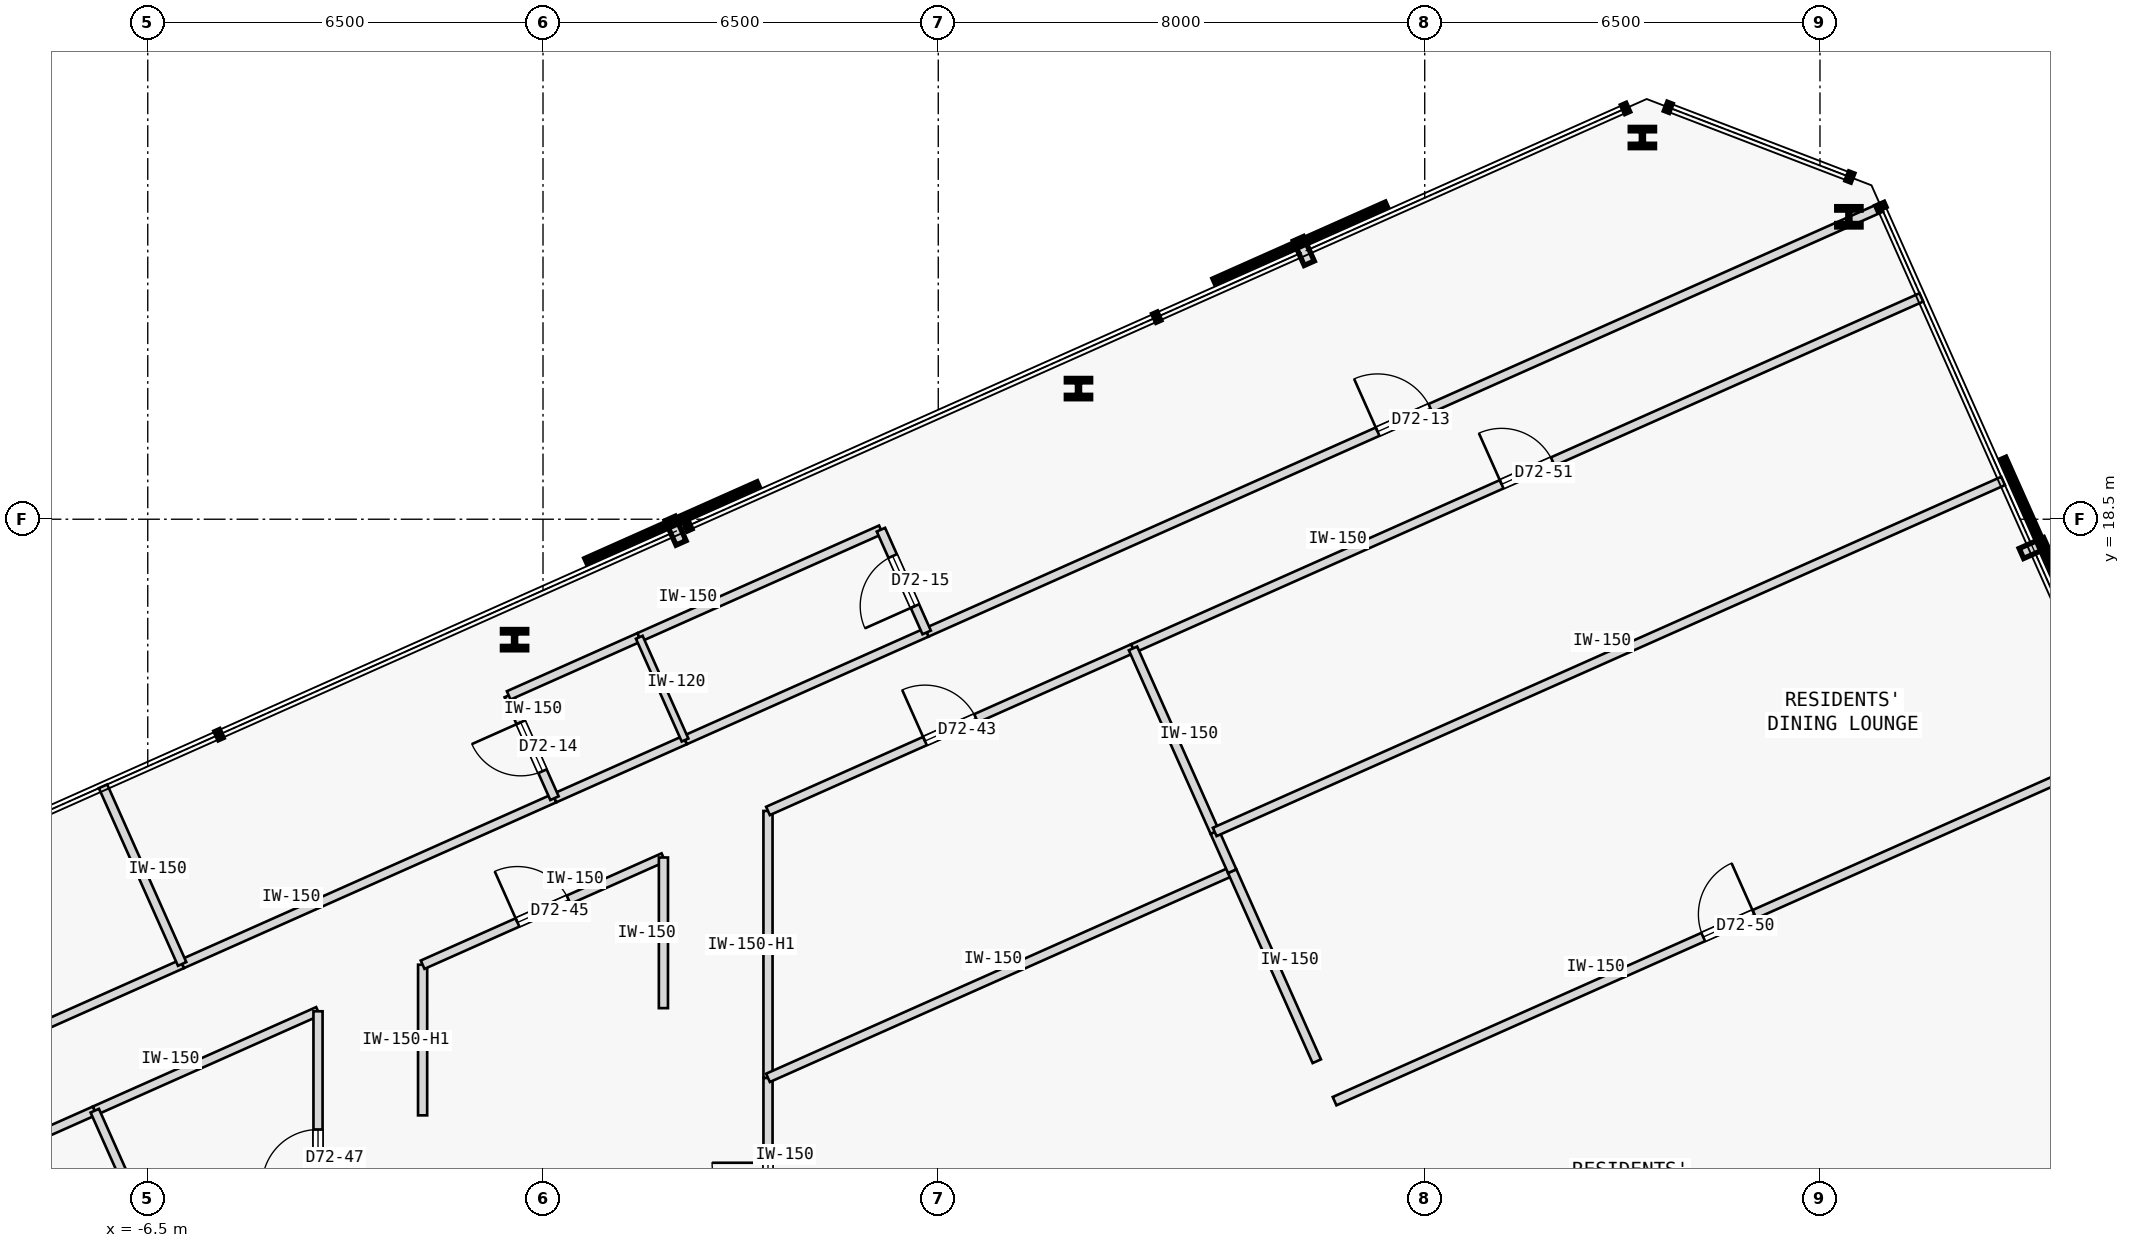
"""IFC4 building model, lengths in metres.
Left out: names, types, materials, properties, quantities, classifications, styles, units other than length and angle.
Written with IfcOpenShell. Run it as: python <this file> out.ifc"""

import sys

from ifc_helpers import new_model, si_unit, direction, frame, frame_2d, origin, origin_2d, place, context, subcontext, project, spatial, rectangle, i_section, extrude, element, fill, save


model = new_model("IFC4")
c1 = context("Model", 3, precision=1e-05, world=origin(), true_north=direction((0.0, 1.0)))
c2 = subcontext(c1, "Body", "Model", "MODEL_VIEW")
j1 = project(units=[si_unit("LENGTHUNIT", "METRE"), si_unit("PLANEANGLEUNIT", "RADIAN")], contexts=[c1])
p1 = place(None, origin())
s1 = spatial("IfcSite", under=j1, at=p1, CompositionType="ELEMENT")
p2 = place(p1, origin())
s2 = spatial("IfcBuilding", under=s1, at=p2, CompositionType="ELEMENT")
p3 = place(p2, frame((0.0, 0.0, 268.9)))
s3 = spatial("IfcBuildingStorey", under=s2, at=p3, CompositionType="ELEMENT", Elevation=268.9)
for number, where, z_axis, x_axis in (
    (1, (21.476, 23.473, 0.0), (0.0, 0.0, 1.0), (1.0, 0.0, 0.0)),
    (2, (18.08, 24.777, 0.0), (0.0, 0.0, 1.0), (1.0, 0.0, 0.0)),
    (3, (8.806, 20.648, 0.0), (0.0, 0.0, 1.0), (1.0, 0.0, 0.0)),
    (4, (-0.468, 16.519, 0.0), (0.0, 0.0, 1.0), (1.0, 0.0, 0.0)),
):
    element("IfcColumn", number, at=place(p3, frame(where, z_axis=z_axis, x_axis=x_axis)), inside=s3, PredefinedType="COLUMN", context=c2, shape_type="SweptSolid", body=[
        extrude(i_section(OverallWidth=0.401, OverallDepth=0.335, WebThickness=0.036, FlangeThickness=0.058, FilletRadius=0.015, at=origin_2d()), origin(), (0.0, 0.0, 1.0), 3.35),
    ])
p4 = place(p3, frame((-18.549, 5.57, 0.0), z_axis=(0.0, 0.0, 1.0), x_axis=(0.913545955058, 0.40673552586, 0.0)))
e5 = element("IfcWall", 5, at=p4, inside=s3, PredefinedType="PARTITIONING", context=c2, shape_type="SweptSolid", body=[
    extrude(rectangle(XDim=13.808, YDim=0.15, at=frame_2d((6.904, 0.0))), origin(), (0.0, 0.0, 1.0), 3.125),
])
p5 = place(p4, frame((6.429, 0.0, 0.0)))
e6 = element("IfcOpeningElement", 6, at=p5, cuts=e5, PredefinedType="OPENING", context=c2, shape_type="SweptSolid", body=[
    extrude(rectangle(XDim=0.95, YDim=2.15, at=frame_2d((0.475, 1.075))), frame((0.0, 0.085, 0.0), z_axis=(0.0, -1.0, 0.0), x_axis=(1.0, 0.0, 0.0)), (0.0, 0.0, 1.0), 0.17),
])
p6 = place(p3, frame((-5.935, 11.187, 0.0), z_axis=(0.0, 0.0, 1.0), x_axis=(0.91354851465, 0.406729776856, 0.0)))
e7 = element("IfcWall", 7, at=p6, inside=s3, PredefinedType="PARTITIONING", context=c2, shape_type="SweptSolid", body=[
    extrude(rectangle(XDim=6.703, YDim=0.15, at=frame_2d((3.352, 0.0))), origin(), (0.0, 0.0, 1.0), 3.125),
])
p7 = place(p3, frame((6.31, 16.638, 0.0), z_axis=(0.0, 0.0, 1.0), x_axis=(0.913550659227, 0.406724959925, 0.0)))
e8 = element("IfcWall", 8, at=p7, inside=s3, PredefinedType="PARTITIONING", context=c2, shape_type="SweptSolid", body=[
    extrude(rectangle(XDim=17.185, YDim=0.15, at=frame_2d((8.592, 0.0))), origin(), (0.0, 0.0, 1.0), 3.125),
])
p8 = place(p7, frame((8.117, 0.0, 0.0)))
e9 = element("IfcOpeningElement", 9, at=p8, cuts=e8, PredefinedType="OPENING", context=c2, shape_type="SweptSolid", body=[
    extrude(rectangle(XDim=0.95, YDim=2.15, at=frame_2d((0.475, 1.075))), frame((0.0, 0.085, 0.0), z_axis=(0.0, -1.0, 0.0), x_axis=(1.0, 0.0, 0.0)), (0.0, 0.0, 1.0), 0.17),
])
p9 = place(p3, frame((0.189, 13.913, 0.0), z_axis=(0.0, 0.0, 1.0), x_axis=(0.913520021435, 0.406793768926, 0.0)))
e10 = element("IfcWall", 10, at=p9, inside=s3, PredefinedType="PARTITIONING", context=c2, shape_type="SweptSolid", body=[
    extrude(rectangle(XDim=2.35, YDim=0.15, at=frame_2d((1.175, 0.0))), origin(), (0.0, 0.0, 1.0), 3.125),
])
p10 = place(p3, frame((2.336, 14.869, 0.0), z_axis=(0.0, 0.0, 1.0), x_axis=(0.913545193015, 0.406737237438, 0.0)))
e11 = element("IfcWall", 11, at=p10, inside=s3, PredefinedType="PARTITIONING", context=c2, shape_type="SweptSolid", body=[
    extrude(rectangle(XDim=4.35, YDim=0.15, at=frame_2d((2.175, 0.0))), origin(), (0.0, 0.0, 1.0), 3.125),
])
p11 = place(p3, frame((3.7, 5.601, 0.0), z_axis=(0.0, 0.0, 1.0), x_axis=(0.0, 1.0, 0.0)))
e12 = element("IfcWall", 12, at=p11, inside=s3, PredefinedType="PARTITIONING", context=c2, shape_type="SweptSolid", body=[
    extrude(rectangle(XDim=3.713, YDim=0.15, at=frame_2d((1.856, 0.0))), origin(), (0.0, 0.0, 1.0), 3.125),
])
p12 = place(p11, frame((1.396, 0.0, 0.0)))
e13 = element("IfcOpeningElement", 13, at=p12, cuts=e12, PredefinedType="OPENING", context=c2, shape_type="SweptSolid", body=[
    extrude(rectangle(XDim=0.92, YDim=2.15, at=frame_2d((0.46, 1.075))), frame((0.0, 0.085, 0.0), z_axis=(0.0, -1.0, 0.0), x_axis=(1.0, 0.0, 0.0)), (0.0, 0.0, 1.0), 0.17),
])
p13 = place(p3, frame((3.7, 9.313, 0.0), z_axis=(0.0, 0.0, 1.0), x_axis=(-0.000111240891, 0.999999993813, 0.0)))
e14 = element("IfcWall", 14, at=p13, inside=s3, PredefinedType="PARTITIONING", context=c2, shape_type="SweptSolid", body=[
    extrude(rectangle(XDim=4.389, YDim=0.15, at=frame_2d((2.195, 0.0))), origin(), (0.0, 0.0, 1.0), 2.675),
])
p14 = place(p3, frame((3.7, 13.703, 0.0), z_axis=(0.0, 0.0, 1.0), x_axis=(0.913549363376, 0.406727870542, 0.0)))
e15 = element("IfcWall", 15, at=p14, inside=s3, PredefinedType="PARTITIONING", context=c2, shape_type="SweptSolid", body=[
    extrude(rectangle(XDim=6.571, YDim=0.15, at=frame_2d((3.286, 0.0))), origin(), (0.0, 0.0, 1.0), 3.125),
])
p15 = place(p14, frame((2.825, 0.0, 0.0)))
e16 = element("IfcOpeningElement", 16, at=p15, cuts=e15, PredefinedType="OPENING", context=c2, shape_type="SweptSolid", body=[
    extrude(rectangle(XDim=0.92, YDim=2.15, at=frame_2d((0.46, 1.075))), frame((0.0, 0.085, 0.0), z_axis=(0.0, -1.0, 0.0), x_axis=(1.0, 0.0, 0.0)), (0.0, 0.0, 1.0), 0.17),
])
p16 = place(p3, frame((-1.98, 8.697, 0.0), z_axis=(0.0, 0.0, 1.0), x_axis=(0.000197102588, 0.999999980575, 0.0)))
e17 = element("IfcWall", 17, at=p16, inside=s3, PredefinedType="PARTITIONING", context=c2, shape_type="SweptSolid", body=[
    extrude(rectangle(XDim=2.477, YDim=0.15, at=frame_2d((1.239, 0.0))), origin(), (0.0, 0.0, 1.0), 2.675),
])
p17 = place(p3, frame((-1.98, 11.174, 0.0), z_axis=(0.0, 0.0, 1.0), x_axis=(0.913546598225, 0.406734081276, 0.0)))
e18 = element("IfcWall", 18, at=p17, inside=s3, PredefinedType="PARTITIONING", context=c2, shape_type="SweptSolid", body=[
    extrude(rectangle(XDim=4.335, YDim=0.15, at=frame_2d((2.167, 0.0))), origin(), (0.0, 0.0, 1.0), 3.125),
])
p18 = place(p17, frame((1.708, 0.0, 0.0)))
e19 = element("IfcOpeningElement", 19, at=p18, cuts=e18, PredefinedType="OPENING", context=c2, shape_type="SweptSolid", body=[
    extrude(rectangle(XDim=0.92, YDim=2.15, at=frame_2d((0.46, 1.075))), frame((0.0, 0.085, 0.0), z_axis=(0.0, -1.0, 0.0), x_axis=(1.0, 0.0, 0.0)), (0.0, 0.0, 1.0), 0.17),
])
p19 = place(p3, frame((1.98, 10.46, 0.0), z_axis=(0.0, 0.0, 1.0), x_axis=(0.000197102588, 0.999999980575, 0.0)))
e20 = element("IfcWall", 20, at=p19, inside=s3, PredefinedType="PARTITIONING", context=c2, shape_type="SweptSolid", body=[
    extrude(rectangle(XDim=2.477, YDim=0.15, at=frame_2d((1.239, 0.0))), origin(), (0.0, 0.0, 1.0), 3.125),
])
p20 = place(p3, frame((-10.504, 7.379, 0.0), z_axis=(0.0, 0.0, 1.0), x_axis=(0.913526514415, 0.406779187596, 0.0)))
e21 = element("IfcWall", 21, at=p20, inside=s3, PredefinedType="PARTITIONING", context=c2, shape_type="SweptSolid", body=[
    extrude(rectangle(XDim=3.429, YDim=0.15, at=frame_2d((1.714, 0.0))), origin(), (0.0, 0.0, 1.0), 3.125),
])
p21 = place(p20, frame((1.254, 0.0, 0.0)))
e22 = element("IfcOpeningElement", 22, at=p21, cuts=e21, PredefinedType="OPENING", context=c2, shape_type="SweptSolid", body=[
    extrude(rectangle(XDim=0.92, YDim=2.15, at=frame_2d((0.46, 1.075))), frame((0.0, 0.085, 0.0), z_axis=(0.0, -1.0, 0.0), x_axis=(1.0, 0.0, 0.0)), (0.0, 0.0, 1.0), 0.17),
])
p22 = place(p3, frame((-7.372, 8.774, 0.0), z_axis=(0.0, 0.0, 1.0), x_axis=(0.913563383118, 0.406696379412, 0.0)))
e23 = element("IfcWall", 23, at=p22, inside=s3, PredefinedType="PARTITIONING", context=c2, shape_type="SweptSolid", body=[
    extrude(rectangle(XDim=4.019, YDim=0.15, at=frame_2d((2.01, 0.0))), origin(), (0.0, 0.0, 1.0), 3.125),
])
p23 = place(p3, frame((-3.7, 5.6, 0.0), z_axis=(0.0, 0.0, 1.0), x_axis=(5.077173e-05, 0.999999998711, 0.0)))
e24 = element("IfcWall", 24, at=p23, inside=s3, PredefinedType="PARTITIONING", context=c2, shape_type="SweptSolid", body=[
    extrude(rectangle(XDim=4.809, YDim=0.15, at=frame_2d((2.404, 0.0))), origin(), (0.0, 0.0, 1.0), 3.125),
])
p24 = place(p23, frame((1.944, 0.0, 0.0)))
e25 = element("IfcOpeningElement", 25, at=p24, cuts=e24, PredefinedType="OPENING", context=c2, shape_type="SweptSolid", body=[
    extrude(rectangle(XDim=0.92, YDim=2.15, at=frame_2d((0.46, 1.075))), frame((0.0, 0.085, 0.0), z_axis=(0.0, -1.0, 0.0), x_axis=(1.0, 0.0, 0.0)), (0.0, 0.0, 1.0), 0.17),
])
p25 = place(p3, frame((9.703, 16.375, 0.0), z_axis=(0.0, 0.0, 1.0), x_axis=(0.913544622417, 0.406738519018, 0.0)))
e26 = element("IfcWall", 26, at=p25, inside=s3, PredefinedType="PARTITIONING", context=c2, shape_type="SweptSolid", body=[
    extrude(rectangle(XDim=14.192, YDim=0.15, at=frame_2d((7.096, 0.0))), origin(), (0.0, 0.0, 1.0), 3.125),
])
p26 = place(p25, frame((6.636, 0.0, 0.0)))
e27 = element("IfcOpeningElement", 27, at=p26, cuts=e26, PredefinedType="OPENING", context=c2, shape_type="SweptSolid", body=[
    extrude(rectangle(XDim=0.92, YDim=2.15, at=frame_2d((0.46, 1.075))), frame((0.0, 0.085, 0.0), z_axis=(0.0, -1.0, 0.0), x_axis=(1.0, 0.0, 0.0)), (0.0, 0.0, 1.0), 0.17),
])
p27 = place(p3, frame((-5.935, 11.187, 0.0), z_axis=(0.0, 0.0, 1.0), x_axis=(-0.406733350739, 0.913546923478, 0.0)))
e28 = element("IfcWall", 28, at=p27, inside=s3, PredefinedType="PARTITIONING", context=c2, shape_type="SweptSolid", body=[
    extrude(rectangle(XDim=3.198, YDim=0.15, at=frame_2d((1.599, 0.0))), origin(), (0.0, 0.0, 1.0), 3.125),
])
p28 = place(p3, frame((0.189, 13.913, 0.0), z_axis=(0.0, 0.0, 1.0), x_axis=(-0.406701600856, 0.913561058639, 0.0)))
e29 = element("IfcWall", 29, at=p28, inside=s3, PredefinedType="PARTITIONING", context=c2, shape_type="SweptSolid", body=[
    extrude(rectangle(XDim=1.85, YDim=0.15, at=frame_2d((0.925, 0.0))), origin(), (0.0, 0.0, 1.0), 3.125),
])
p29 = place(p28, frame((0.485, 0.0, 0.0)))
e30 = element("IfcOpeningElement", 30, at=p29, cuts=e29, PredefinedType="OPENING", context=c2, shape_type="SweptSolid", body=[
    extrude(rectangle(XDim=0.88, YDim=2.15, at=frame_2d((0.44, 1.075))), frame((0.0, 0.085, 0.0), z_axis=(0.0, -1.0, 0.0), x_axis=(1.0, 0.0, 0.0)), (0.0, 0.0, 1.0), 0.17),
])
p30 = place(p3, frame((-0.564, 15.603, 0.0), z_axis=(0.0, 0.0, 1.0), x_axis=(0.913541436194, 0.406745675276, 0.0)))
e31 = element("IfcWall", 31, at=p30, inside=s3, PredefinedType="PARTITIONING", context=c2, shape_type="SweptSolid", body=[
    extrude(rectangle(XDim=2.35, YDim=0.15, at=frame_2d((1.175, 0.0))), origin(), (0.0, 0.0, 1.0), 3.125),
])
p31 = place(p3, frame((1.583, 16.559, 0.0), z_axis=(0.0, 0.0, 1.0), x_axis=(0.913554477336, 0.406716383908, 0.0)))
e32 = element("IfcWall", 32, at=p31, inside=s3, PredefinedType="PARTITIONING", context=c2, shape_type="SweptSolid", body=[
    extrude(rectangle(XDim=4.35, YDim=0.15, at=frame_2d((2.175, 0.0))), origin(), (0.0, 0.0, 1.0), 3.125),
])
p32 = place(p3, frame((6.31, 16.638, 0.0), z_axis=(0.0, 0.0, 1.0), x_axis=(-0.406750635596, 0.913539227643, 0.0)))
e33 = element("IfcWall", 33, at=p32, inside=s3, PredefinedType="PARTITIONING", context=c2, shape_type="SweptSolid", body=[
    extrude(rectangle(XDim=1.85, YDim=0.15, at=frame_2d((0.925, 0.0))), origin(), (0.0, 0.0, 1.0), 3.125),
])
p33 = place(p32, frame((0.475, 0.0, 0.0)))
e34 = element("IfcOpeningElement", 34, at=p33, cuts=e33, PredefinedType="OPENING", context=c2, shape_type="SweptSolid", body=[
    extrude(rectangle(XDim=0.9, YDim=2.15, at=frame_2d((0.45, 1.075))), frame((0.0, 0.085, 0.0), z_axis=(0.0, -1.0, 0.0), x_axis=(1.0, 0.0, 0.0)), (0.0, 0.0, 1.0), 0.17),
])
p34 = place(p3, frame((2.336, 14.869, 0.0), z_axis=(0.0, 0.0, 1.0), x_axis=(-0.406860767979, 0.913490183571, 0.0)))
e35 = element("IfcWall", 35, at=p34, inside=s3, PredefinedType="PARTITIONING", context=c2, shape_type="SweptSolid", body=[
    extrude(rectangle(XDim=1.85, YDim=0.12, at=frame_2d((0.925, 0.0))), origin(), (0.0, 0.0, 1.0), 3.125),
])
p35 = place(p3, frame((3.7, 9.313, 0.0), z_axis=(0.0, 0.0, 1.0), x_axis=(0.913545080962, 0.406737489112, 0.0)))
e36 = element("IfcWall", 36, at=p35, inside=s3, PredefinedType="PARTITIONING", context=c2, shape_type="SweptSolid", body=[
    extrude(rectangle(XDim=8.356, YDim=0.15, at=frame_2d((4.178, 0.0))), origin(), (0.0, 0.0, 1.0), 3.125),
])
p36 = place(p3, frame((12.725, 9.587, 0.0), z_axis=(0.0, 0.0, 1.0), x_axis=(-0.406714462948, 0.913555332549, 0.0)))
e37 = element("IfcWall", 37, at=p36, inside=s3, PredefinedType="PARTITIONING", context=c2, shape_type="SweptSolid", body=[
    extrude(rectangle(XDim=3.421, YDim=0.15, at=frame_2d((1.71, 0.0))), origin(), (0.0, 0.0, 1.0), 3.125),
])
p37 = place(p3, frame((11.334, 12.712, 0.0), z_axis=(0.0, 0.0, 1.0), x_axis=(-0.40694029237, 0.913454759934, 0.0)))
e38 = element("IfcWall", 38, at=p37, inside=s3, PredefinedType="PARTITIONING", context=c2, shape_type="SweptSolid", body=[
    extrude(rectangle(XDim=0.706, YDim=0.15, at=frame_2d((0.353, 0.0))), origin(), (0.0, 0.0, 1.0), 3.125),
])
p38 = place(p3, frame((11.046, 13.357, 0.0), z_axis=(0.0, 0.0, 1.0), x_axis=(-0.406714303965, 0.913555403328, 0.0)))
e39 = element("IfcWall", 39, at=p38, inside=s3, PredefinedType="PARTITIONING", context=c2, shape_type="SweptSolid", body=[
    extrude(rectangle(XDim=3.304, YDim=0.15, at=frame_2d((1.652, 0.0))), origin(), (0.0, 0.0, 1.0), 3.125),
])
p39 = place(p3, frame((-5.958, 5.6, 0.0), z_axis=(0.0, 0.0, 1.0), x_axis=(-0.406738231884, 0.913544750258, 0.0)))
e40 = element("IfcWall", 40, at=p39, inside=s3, PredefinedType="PARTITIONING", context=c2, shape_type="SweptSolid", body=[
    extrude(rectangle(XDim=3.474, YDim=0.15, at=frame_2d((1.737, 0.0))), origin(), (0.0, 0.0, 1.0), 3.125),
])
p40 = place(p3, frame((15.616, 3.094, 0.0), z_axis=(0.0, 0.0, 1.0), x_axis=(0.913550635989, 0.40672501212, 0.0)))
e41 = element("IfcWall", 41, at=p40, inside=s3, PredefinedType="PARTITIONING", context=c2, shape_type="SweptSolid", body=[
    extrude(rectangle(XDim=12.202, YDim=0.15, at=frame_2d((6.101, 0.0))), origin(), (0.0, 0.0, 1.0), 3.125),
])
p41 = place(p3, frame((13.018, 8.93, 0.0), z_axis=(0.0, 0.0, 1.0), x_axis=(0.913551014388, 0.406724162191, 0.0)))
e42 = element("IfcWall", 42, at=p41, inside=s3, PredefinedType="PARTITIONING", context=c2, shape_type="SweptSolid", body=[
    extrude(rectangle(XDim=14.192, YDim=0.15, at=frame_2d((7.096, 0.0))), origin(), (0.0, 0.0, 1.0), 3.125),
])
p42 = place(p41, frame((6.636, 0.0, 0.0)))
e43 = element("IfcOpeningElement", 43, at=p42, cuts=e42, PredefinedType="OPENING", context=c2, shape_type="SweptSolid", body=[
    extrude(rectangle(XDim=0.92, YDim=2.15, at=frame_2d((0.46, 1.075))), frame((0.0, 0.085, 0.0), z_axis=(0.0, -1.0, 0.0), x_axis=(1.0, 0.0, 0.0)), (0.0, 0.0, 1.0), 0.17),
])
p43 = place(p3, frame((11.046, 13.357, 0.0), z_axis=(0.0, 0.0, 1.0), x_axis=(0.913553860075, 0.406717770379, 0.0)))
e44 = element("IfcWall", 44, at=p43, inside=s3, PredefinedType="PARTITIONING", context=c2, shape_type="SweptSolid", body=[
    extrude(rectangle(XDim=14.192, YDim=0.15, at=frame_2d((7.096, 0.0))), origin(), (0.0, 0.0, 1.0), 3.125),
])
p44 = place(p8, origin())
e45 = element("IfcDoor", 45, at=p44, inside=s3, OperationType="SINGLE_SWING_LEFT", PredefinedType="DOOR", context=c2, shape_type="SweptSolid", body=[
    extrude(rectangle(XDim=0.95, YDim=2.15, at=frame_2d((0.475, 1.075))), frame((0.0, 0.025, 0.0), z_axis=(0.0, -1.0, 0.0), x_axis=(1.0, 0.0, 0.0)), (0.0, 0.0, 1.0), 0.05),
])
fill(e9, e45)
p45 = place(p29, origin())
e46 = element("IfcDoor", 46, at=p45, inside=s3, OperationType="SINGLE_SWING_RIGHT", PredefinedType="DOOR", context=c2, shape_type="SweptSolid", body=[
    extrude(rectangle(XDim=0.88, YDim=2.15, at=frame_2d((0.44, 1.075))), frame((0.0, 0.025, 0.0), z_axis=(0.0, -1.0, 0.0), x_axis=(1.0, 0.0, 0.0)), (0.0, 0.0, 1.0), 0.05),
])
fill(e30, e46)
p46 = place(p33, origin())
e47 = element("IfcDoor", 47, at=p46, inside=s3, OperationType="SINGLE_SWING_LEFT", PredefinedType="DOOR", context=c2, shape_type="SweptSolid", body=[
    extrude(rectangle(XDim=0.9, YDim=2.15, at=frame_2d((0.45, 1.075))), frame((0.0, 0.025, 0.0), z_axis=(0.0, -1.0, 0.0), x_axis=(1.0, 0.0, 0.0)), (0.0, 0.0, 1.0), 0.05),
])
fill(e34, e47)
p47 = place(p12, origin())
e48 = element("IfcDoor", 48, at=p47, inside=s3, OperationType="SINGLE_SWING_RIGHT", PredefinedType="DOOR", context=c2, shape_type="SweptSolid", body=[
    extrude(rectangle(XDim=0.92, YDim=2.15, at=frame_2d((0.46, 1.075))), frame((0.0, 0.025, 0.0), z_axis=(0.0, -1.0, 0.0), x_axis=(1.0, 0.0, 0.0)), (0.0, 0.0, 1.0), 0.05),
])
fill(e13, e48)
p48 = place(p15, origin())
e49 = element("IfcDoor", 49, at=p48, inside=s3, OperationType="SINGLE_SWING_LEFT", PredefinedType="DOOR", context=c2, shape_type="SweptSolid", body=[
    extrude(rectangle(XDim=0.92, YDim=2.15, at=frame_2d((0.46, 1.075))), frame((0.0, 0.025, 0.0), z_axis=(0.0, -1.0, 0.0), x_axis=(1.0, 0.0, 0.0)), (0.0, 0.0, 1.0), 0.05),
])
fill(e16, e49)
p49 = place(p18, origin())
e50 = element("IfcDoor", 50, at=p49, inside=s3, OperationType="SINGLE_SWING_LEFT", PredefinedType="DOOR", context=c2, shape_type="SweptSolid", body=[
    extrude(rectangle(XDim=0.92, YDim=2.15, at=frame_2d((0.46, 1.075))), frame((0.0, 0.025, 0.0), z_axis=(0.0, -1.0, 0.0), x_axis=(1.0, 0.0, 0.0)), (0.0, 0.0, 1.0), 0.05),
])
fill(e19, e50)
p50 = place(p24, origin())
e51 = element("IfcDoor", 51, at=p50, inside=s3, OperationType="SINGLE_SWING_LEFT", PredefinedType="DOOR", context=c2, shape_type="SweptSolid", body=[
    extrude(rectangle(XDim=0.92, YDim=2.15, at=frame_2d((0.46, 1.075))), frame((0.0, 0.025, 0.0), z_axis=(0.0, -1.0, 0.0), x_axis=(1.0, 0.0, 0.0)), (0.0, 0.0, 1.0), 0.05),
])
fill(e25, e51)
p51 = place(p42, origin())
e52 = element("IfcDoor", 52, at=p51, inside=s3, OperationType="SINGLE_SWING_RIGHT", PredefinedType="DOOR", context=c2, shape_type="SweptSolid", body=[
    extrude(rectangle(XDim=0.92, YDim=2.15, at=frame_2d((0.46, 1.075))), frame((0.0, 0.025, 0.0), z_axis=(0.0, -1.0, 0.0), x_axis=(1.0, 0.0, 0.0)), (0.0, 0.0, 1.0), 0.05),
])
fill(e43, e52)
p52 = place(p26, origin())
e53 = element("IfcDoor", 53, at=p52, inside=s3, OperationType="SINGLE_SWING_LEFT", PredefinedType="DOOR", context=c2, shape_type="SweptSolid", body=[
    extrude(rectangle(XDim=0.92, YDim=2.15, at=frame_2d((0.46, 1.075))), frame((0.0, 0.025, 0.0), z_axis=(0.0, -1.0, 0.0), x_axis=(1.0, 0.0, 0.0)), (0.0, 0.0, 1.0), 0.05),
])
fill(e27, e53)
save(model, sys.argv[1])
